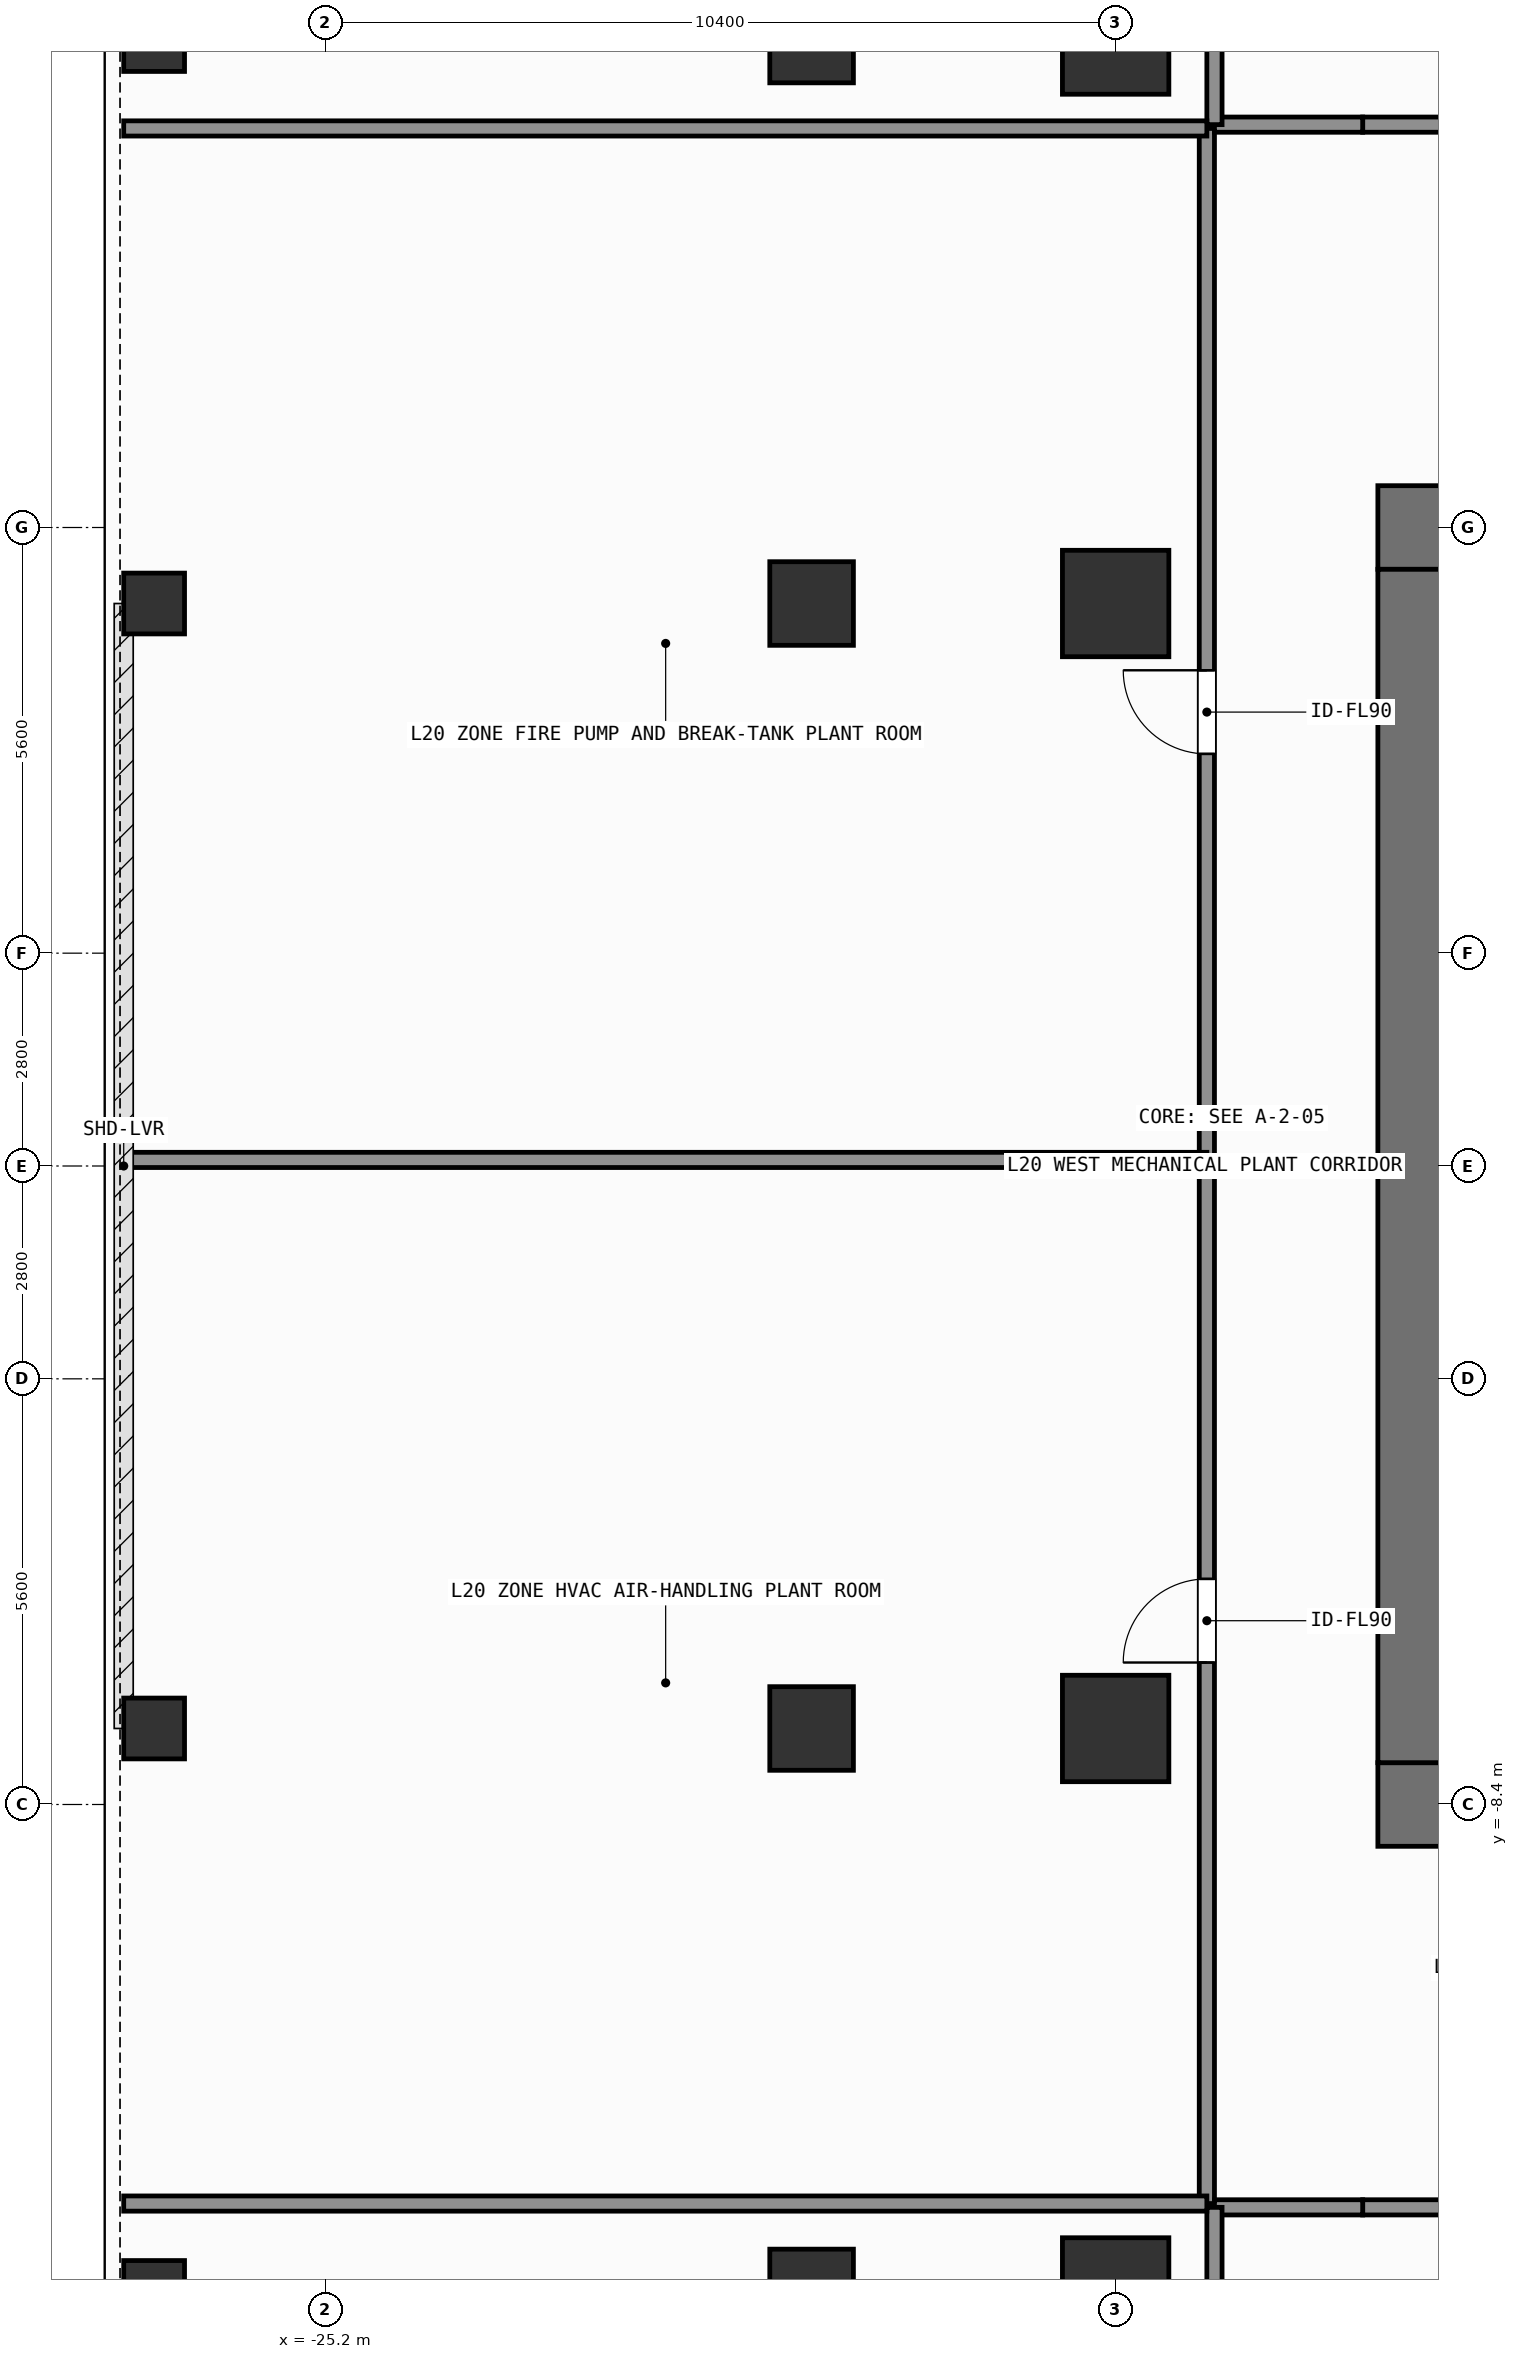
"""IFC4 building model, lengths in metres.
Left out: names, types, materials, properties, quantities, classifications, styles, units other than length and angle.
Written with IfcOpenShell. Run it as: python <this file> out.ifc"""

import sys

from ifc_helpers import new_model, si_unit, direction, frame, frame_2d, origin, origin_2d, place, context, subcontext, project, spatial, rectangle, hollow_rectangle, extrude, element, fill, save


model = new_model("IFC4")
c1 = context("Model", 3, precision=1e-05, world=origin(), true_north=direction((0.0, 1.0)))
c2 = subcontext(c1, "Body", "Model", "MODEL_VIEW")
j1 = project(units=[si_unit("LENGTHUNIT", "METRE"), si_unit("PLANEANGLEUNIT", "RADIAN")], contexts=[c1])
p1 = place(None, origin())
s1 = spatial("IfcSite", under=j1, at=p1, CompositionType="ELEMENT")
p2 = place(p1, origin())
s2 = spatial("IfcBuilding", under=s1, at=p2, CompositionType="ELEMENT")
p3 = place(p2, frame((0.0, 0.0, 77.4)))
s3 = spatial("IfcBuildingStorey", under=s2, at=p3, CompositionType="ELEMENT", Elevation=77.4)
for number, where, z_axis, x_axis in (
    (1, (-11.35, -8.4, 0.0), (0.0, 0.0, 1.0), (1.0, 0.0, 0.0)),
    (2, (-11.35, 8.4, 0.0), (0.0, 0.0, 1.0), (1.0, 0.0, 0.0)),
):
    element("IfcWall", number, at=place(p3, frame(where, z_axis=z_axis, x_axis=x_axis)), inside=s3, PredefinedType="SHEAR", context=c2, shape_type="SweptSolid", body=[
        extrude(rectangle(XDim=1.65, YDim=1.1, at=frame_2d((0.825, 0.0))), origin(), (0.0, 0.0, 1.0), 7.8),
    ])
p4 = place(p3, frame((-10.8, -7.85, 0.0), z_axis=(0.0, 0.0, 1.0), x_axis=(0.0, 1.0, 0.0)))
e3 = element("IfcWall", 3, at=p4, inside=s3, PredefinedType="SHEAR", context=c2, shape_type="SweptSolid", body=[
    extrude(rectangle(XDim=15.7, YDim=1.1, at=frame_2d((7.85, 0.0))), origin(), (0.0, 0.0, 1.0), 7.8),
])
for number, where, z_axis, x_axis in (
    (4, (-14.8, -14.8, 0.0), (0.0, 0.0, 1.0), (1.0, 0.0, 0.0)),
    (5, (-14.8, 14.8, 0.0), (0.0, 0.0, 1.0), (1.0, 0.0, 0.0)),
    (6, (-14.8, -7.4, 0.0), (0.0, 0.0, 1.0), (1.0, 0.0, 0.0)),
    (7, (-14.8, 7.4, 0.0), (0.0, 0.0, 1.0), (1.0, 0.0, 0.0)),
):
    element("IfcColumn", number, at=place(p3, frame(where, z_axis=z_axis, x_axis=x_axis)), inside=s3, PredefinedType="COLUMN", context=c2, shape_type="SweptSolid", body=[
        extrude(rectangle(XDim=1.4, YDim=1.4, at=origin_2d()), origin(), (0.0, 0.0, 1.0), 7.8),
    ])
for number, where, z_axis, x_axis in (
    (8, (-18.8, -14.8, 0.0), (0.0, 0.0, 1.0), (1.0, 0.0, 0.0)),
    (9, (-18.8, -7.4, 0.0), (0.0, 0.0, 1.0), (1.0, 0.0, 0.0)),
    (10, (-18.8, 7.4, 0.0), (0.0, 0.0, 1.0), (1.0, 0.0, 0.0)),
    (11, (-18.8, 14.8, 0.0), (0.0, 0.0, 1.0), (1.0, 0.0, 0.0)),
):
    element("IfcColumn", number, at=place(p3, frame(where, z_axis=z_axis, x_axis=x_axis)), inside=s3, PredefinedType="COLUMN", context=c2, shape_type="SweptSolid", body=[
        extrude(rectangle(XDim=1.1, YDim=1.1, at=origin_2d()), origin(), (0.0, 0.0, 1.0), 7.8),
    ])
for number, where, z_axis, x_axis in (
    (12, (-27.45, -14.8, 0.0), (0.0, 0.0, 1.0), (1.0, 0.0, 0.0)),
    (13, (-27.45, -7.4, 0.0), (0.0, 0.0, 1.0), (1.0, 0.0, 0.0)),
    (14, (-27.45, 7.4, 0.0), (0.0, 0.0, 1.0), (1.0, 0.0, 0.0)),
    (15, (-27.45, 14.8, 0.0), (0.0, 0.0, 1.0), (1.0, 0.0, 0.0)),
):
    element("IfcColumn", number, at=place(p3, frame(where, z_axis=z_axis, x_axis=x_axis)), inside=s3, PredefinedType="COLUMN", context=c2, shape_type="SweptSolid", body=[
        extrude(hollow_rectangle(XDim=0.8, YDim=0.8, WallThickness=0.036, at=origin_2d()), origin(), (0.0, 0.0, 1.0), 7.8),
    ])
p5 = place(p3, frame((-11.55, -13.7, 0.0), z_axis=(0.0, 0.0, 1.0), x_axis=(1.0, 0.0, 0.0)))
e16 = element("IfcWall", 16, at=p5, inside=s3, PredefinedType="SOLIDWALL", context=c2, shape_type="SweptSolid", body=[
    extrude(rectangle(XDim=27.15, YDim=0.2, at=frame_2d((13.575, 0.0))), origin(), (0.0, 0.0, 1.0), 7.52),
])
p6 = place(p5, frame((9.114, 0.0, 0.0)))
e17 = element("IfcOpeningElement", 17, at=p6, cuts=e16, PredefinedType="OPENING", context=c2, shape_type="SweptSolid", body=[
    extrude(rectangle(XDim=1.4, YDim=2.2, at=frame_2d((0.7, 1.1))), frame((0.0, 0.11, 0.0), z_axis=(0.0, -1.0, 0.0), x_axis=(1.0, 0.0, 0.0)), (0.0, 0.0, 1.0), 0.22),
])
p7 = place(p3, frame((-11.55, 13.7, 0.0), z_axis=(0.0, 0.0, 1.0), x_axis=(1.0, 0.0, 0.0)))
e18 = element("IfcWall", 18, at=p7, inside=s3, PredefinedType="SOLIDWALL", context=c2, shape_type="SweptSolid", body=[
    extrude(rectangle(XDim=27.15, YDim=0.2, at=frame_2d((13.575, 0.0))), origin(), (0.0, 0.0, 1.0), 7.52),
])
p8 = place(p7, frame((9.114, 0.0, 0.0)))
e19 = element("IfcOpeningElement", 19, at=p8, cuts=e18, PredefinedType="OPENING", context=c2, shape_type="SweptSolid", body=[
    extrude(rectangle(XDim=1.4, YDim=2.2, at=frame_2d((0.7, 1.1))), frame((0.0, 0.11, 0.0), z_axis=(0.0, -1.0, 0.0), x_axis=(1.0, 0.0, 0.0)), (0.0, 0.0, 1.0), 0.22),
])
p9 = place(p3, frame((-13.6, -13.65, 0.0), z_axis=(0.0, 0.0, 1.0), x_axis=(0.0, 1.0, 0.0)))
e20 = element("IfcWall", 20, at=p9, inside=s3, PredefinedType="SOLIDWALL", context=c2, shape_type="SweptSolid", body=[
    extrude(rectangle(XDim=13.73, YDim=0.2, at=frame_2d((6.865, 0.0))), origin(), (0.0, 0.0, 1.0), 7.52),
])
p10 = place(p9, frame((7.118, 0.0, 0.0)))
e21 = element("IfcOpeningElement", 21, at=p10, cuts=e20, PredefinedType="OPENING", context=c2, shape_type="SweptSolid", body=[
    extrude(rectangle(XDim=1.1, YDim=2.15, at=frame_2d((0.55, 1.075))), frame((0.0, 0.11, 0.0), z_axis=(0.0, -1.0, 0.0), x_axis=(1.0, 0.0, 0.0)), (0.0, 0.0, 1.0), 0.22),
])
p11 = place(p3, frame((-13.6, 0.08, 0.0), z_axis=(0.0, 0.0, 1.0), x_axis=(0.0, 1.0, 0.0)))
e22 = element("IfcWall", 22, at=p11, inside=s3, PredefinedType="SOLIDWALL", context=c2, shape_type="SweptSolid", body=[
    extrude(rectangle(XDim=13.57, YDim=0.2, at=frame_2d((6.785, 0.0))), origin(), (0.0, 0.0, 1.0), 7.52),
])
p12 = place(p11, frame((5.342, 0.0, 0.0)))
e23 = element("IfcOpeningElement", 23, at=p12, cuts=e22, PredefinedType="OPENING", context=c2, shape_type="SweptSolid", body=[
    extrude(rectangle(XDim=1.1, YDim=2.15, at=frame_2d((0.55, 1.075))), frame((0.0, 0.11, 0.0), z_axis=(0.0, -1.0, 0.0), x_axis=(1.0, 0.0, 0.0)), (0.0, 0.0, 1.0), 0.22),
])
for number, where, z_axis, x_axis in (
    (24, (-13.5, -13.7, 0.0), (0.0, 0.0, 1.0), (1.0, 0.0, 0.0)),
    (25, (-13.5, 13.7, 0.0), (0.0, 0.0, 1.0), (1.0, 0.0, 0.0)),
):
    element("IfcWall", number, at=place(p3, frame(where, z_axis=z_axis, x_axis=x_axis)), inside=s3, PredefinedType="SOLIDWALL", context=c2, shape_type="SweptSolid", body=[
        extrude(rectangle(XDim=1.95, YDim=0.2, at=frame_2d((0.975, 0.0))), origin(), (0.0, 0.0, 1.0), 7.52),
    ])
for number, where, z_axis, x_axis in (
    (26, (-13.5, -24.95, 0.0), (0.0, 0.0, 1.0), (0.0, 1.0, 0.0)),
    (27, (-13.5, 13.7, 0.0), (0.0, 0.0, 1.0), (0.0, 1.0, 0.0)),
):
    element("IfcWall", number, at=place(p3, frame(where, z_axis=z_axis, x_axis=x_axis)), inside=s3, PredefinedType="SOLIDWALL", context=c2, shape_type="SweptSolid", body=[
        extrude(rectangle(XDim=11.25, YDim=0.2, at=frame_2d((5.625, 0.0))), origin(), (0.0, 0.0, 1.0), 7.52),
    ])
for number, where, z_axis, x_axis in (
    (28, (-27.85, -13.65, 0.0), (0.0, 0.0, 1.0), (1.0, 0.0, 0.0)),
    (29, (-27.85, 13.65, 0.0), (0.0, 0.0, 1.0), (1.0, 0.0, 0.0)),
    (30, (-27.85, 0.08, 0.0), (0.0, 0.0, 1.0), (1.0, 0.0, 0.0)),
):
    element("IfcWall", number, at=place(p3, frame(where, z_axis=z_axis, x_axis=x_axis)), inside=s3, PredefinedType="SOLIDWALL", context=c2, shape_type="SweptSolid", body=[
        extrude(rectangle(XDim=14.25, YDim=0.2, at=frame_2d((7.125, 0.0))), origin(), (0.0, 0.0, 1.0), 7.52),
    ])
p13 = place(p10, origin())
e31 = element("IfcDoor", 31, at=p13, inside=s3, OperationType="SINGLE_SWING_LEFT", PredefinedType="DOOR", context=c2, shape_type="SweptSolid", body=[
    extrude(rectangle(XDim=1.1, YDim=2.15, at=frame_2d((0.55, 1.075))), frame((0.0, 0.025, 0.0), z_axis=(0.0, -1.0, 0.0), x_axis=(1.0, 0.0, 0.0)), (0.0, 0.0, 1.0), 0.05),
])
fill(e21, e31)
p14 = place(p12, origin())
e32 = element("IfcDoor", 32, at=p14, inside=s3, OperationType="SINGLE_SWING_RIGHT", PredefinedType="DOOR", context=c2, shape_type="SweptSolid", body=[
    extrude(rectangle(XDim=1.1, YDim=2.15, at=frame_2d((0.55, 1.075))), frame((0.0, 0.025, 0.0), z_axis=(0.0, -1.0, 0.0), x_axis=(1.0, 0.0, 0.0)), (0.0, 0.0, 1.0), 0.05),
])
fill(e23, e32)
save(model, sys.argv[1])
